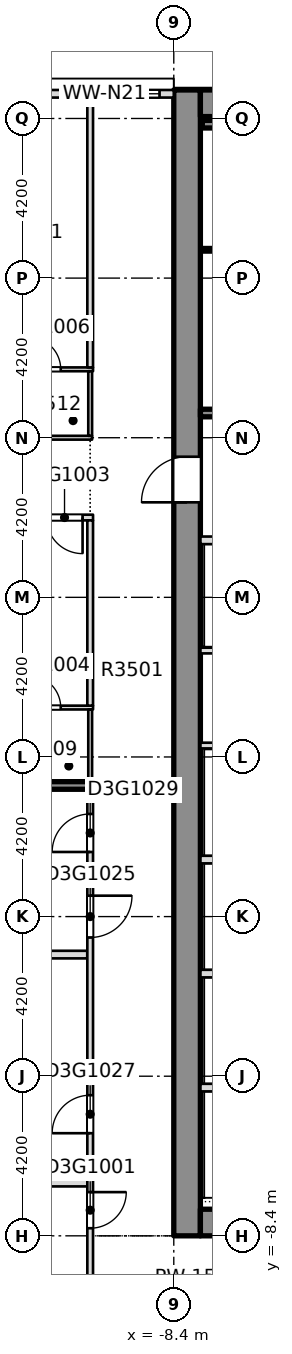
"""IFC4 building model, lengths in metres.
Left out: names, types, materials, properties, quantities, classifications, styles, units other than length and angle.
Written with IfcOpenShell. Run it as: python <this file> out.ifc"""

import sys

from ifc_helpers import new_model, si_unit, direction, frame, frame_2d, origin, place, context, subcontext, project, spatial, rectangle, extrude, element, fill, save


model = new_model("IFC4")
c1 = context("Model", 3, precision=1e-05, world=origin(), true_north=direction((0.0, 1.0)))
c2 = subcontext(c1, "Body", "Model", "MODEL_VIEW")
j1 = project(units=[si_unit("LENGTHUNIT", "METRE"), si_unit("PLANEANGLEUNIT", "RADIAN")], contexts=[c1])
p1 = place(None, origin())
s1 = spatial("IfcSite", under=j1, at=p1, CompositionType="ELEMENT")
p2 = place(p1, origin())
s2 = spatial("IfcBuilding", under=s1, at=p2, CompositionType="ELEMENT")
p3 = place(p2, frame((0.0, 0.0, 140.0)))
s3 = spatial("IfcBuildingStorey", under=s2, at=p3, CompositionType="ELEMENT", Elevation=140.0)
p4 = place(p3, frame((-8.05, -8.4, -0.4), z_axis=(0.0, 0.0, 1.0), x_axis=(0.0, 1.0, 0.0)))
e1 = element("IfcWall", 1, at=p4, inside=s3, PredefinedType="SOLIDWALL", context=c2, shape_type="SweptSolid", body=[
    extrude(rectangle(XDim=30.15, YDim=0.7, at=frame_2d((15.075, 0.0))), origin(), (0.0, 0.0, 1.0), 3.45),
])
p5 = place(p4, frame((19.3, 0.0, 0.4)))
e2 = element("IfcOpeningElement", 2, at=p5, cuts=e1, PredefinedType="OPENING", context=c2, shape_type="SweptSolid", body=[
    extrude(rectangle(XDim=1.2, YDim=2.1, at=frame_2d((0.6, 1.05))), frame((0.0, 0.36, 0.0), z_axis=(0.0, -1.0, 0.0), x_axis=(1.0, 0.0, 0.0)), (0.0, 0.0, 1.0), 0.72),
])
p6 = place(p3, frame((-7.7, -8.05, -0.4), z_axis=(0.0, 0.0, 1.0), x_axis=(1.0, 0.0, 0.0)))
e3 = element("IfcWall", 3, at=p6, inside=s3, PredefinedType="SHEAR", context=c2, shape_type="SweptSolid", body=[
    extrude(rectangle(XDim=15.4, YDim=0.7, at=frame_2d((7.7, 0.0))), origin(), (0.0, 0.0, 1.0), 3.45),
])
p7 = place(p6, frame((2.95, 0.0, 0.4)))
e4 = element("IfcOpeningElement", 4, at=p7, cuts=e3, PredefinedType="OPENING", context=c2, shape_type="SweptSolid", body=[
    extrude(rectangle(XDim=1.8, YDim=2.1, at=frame_2d((0.9, 1.05))), frame((0.0, 0.36, 0.0), z_axis=(0.0, -1.0, 0.0), x_axis=(1.0, 0.0, 0.0)), (0.0, 0.0, 1.0), 0.72),
])
p8 = place(p6, frame((10.65, 0.0, 0.4)))
e5 = element("IfcOpeningElement", 5, at=p8, cuts=e3, PredefinedType="OPENING", context=c2, shape_type="SweptSolid", body=[
    extrude(rectangle(XDim=1.8, YDim=2.1, at=frame_2d((0.9, 1.05))), frame((0.0, 0.36, 0.0), z_axis=(0.0, -1.0, 0.0), x_axis=(1.0, 0.0, 0.0)), (0.0, 0.0, 1.0), 0.72),
])
p9 = place(p3, frame((-7.7, 21.4, -0.4), z_axis=(0.0, 0.0, 1.0), x_axis=(1.0, 0.0, 0.0)))
e6 = element("IfcWall", 6, at=p9, inside=s3, PredefinedType="SHEAR", context=c2, shape_type="SweptSolid", body=[
    extrude(rectangle(XDim=15.4, YDim=0.7, at=frame_2d((7.7, 0.0))), origin(), (0.0, 0.0, 1.0), 3.45),
])
p10 = place(p3, frame((-21.55, -7.0, 0.0), z_axis=(0.0, 0.0, 1.0), x_axis=(1.0, 0.0, 0.0)))
e7 = element("IfcWall", 7, at=p10, inside=s3, PredefinedType="PARTITIONING", context=c2, shape_type="SweptSolid", body=[
    extrude(rectangle(XDim=10.875, YDim=0.2, at=frame_2d((5.438, 0.0))), origin(), (0.0, 0.0, 1.0), 3.05),
])
p11 = place(p3, frame((-16.748, -1.0, 0.0), z_axis=(0.0, 0.0, 1.0), x_axis=(1.0, 0.0, 0.0)))
e8 = element("IfcWall", 8, at=p11, inside=s3, PredefinedType="PARTITIONING", context=c2, shape_type="SweptSolid", body=[
    extrude(rectangle(XDim=6.071, YDim=0.2, at=frame_2d((3.036, 0.0))), origin(), (0.0, 0.0, 1.0), 3.05),
])
p12 = place(p3, frame((-16.75, 1.0, 0.0), z_axis=(0.0, 0.0, 1.0), x_axis=(1.0, 0.0, 0.0)))
e9 = element("IfcWall", 9, at=p12, inside=s3, PredefinedType="PARTITIONING", context=c2, shape_type="SweptSolid", body=[
    extrude(rectangle(XDim=6.075, YDim=0.2, at=frame_2d((3.038, 0.0))), origin(), (0.0, 0.0, 1.0), 3.05),
])
p13 = place(p3, frame((-13.05, 3.45, 0.0), z_axis=(0.0, 0.0, 1.0), x_axis=(1.0, 0.0, 0.0)))
e10 = element("IfcWall", 10, at=p13, inside=s3, PredefinedType="SOLIDWALL", context=c2, shape_type="SweptSolid", body=[
    extrude(rectangle(XDim=2.525, YDim=0.2, at=frame_2d((1.263, 0.0))), origin(), (0.0, 0.0, 1.0), 3.05),
])
p14 = place(p3, frame((-13.05, 5.5, 0.0), z_axis=(0.0, 0.0, 1.0), x_axis=(1.0, 0.0, 0.0)))
e11 = element("IfcWall", 11, at=p14, inside=s3, PredefinedType="PARTITIONING", context=c2, shape_type="SweptSolid", body=[
    extrude(rectangle(XDim=2.525, YDim=0.1, at=frame_2d((1.263, 0.0))), origin(), (0.0, 0.0, 1.0), 3.05),
])
p15 = place(p14, frame((0.825, 0.0, 0.0)))
e12 = element("IfcOpeningElement", 12, at=p15, cuts=e11, PredefinedType="OPENING", context=c2, shape_type="SweptSolid", body=[
    extrude(rectangle(XDim=0.85, YDim=2.1, at=frame_2d((0.425, 1.05))), frame((0.0, 0.06, 0.0), z_axis=(0.0, -1.0, 0.0), x_axis=(1.0, 0.0, 0.0)), (0.0, 0.0, 1.0), 0.12),
])
p16 = place(p3, frame((-21.55, 10.5, 0.0), z_axis=(0.0, 0.0, 1.0), x_axis=(1.0, 0.0, 0.0)))
e13 = element("IfcWall", 13, at=p16, inside=s3, PredefinedType="PARTITIONING", context=c2, shape_type="SweptSolid", body=[
    extrude(rectangle(XDim=11.025, YDim=0.15, at=frame_2d((5.513, 0.0))), origin(), (0.0, 0.0, 1.0), 3.05),
])
p17 = place(p16, frame((9.8, 0.0, 0.0)))
e14 = element("IfcOpeningElement", 14, at=p17, cuts=e13, PredefinedType="OPENING", context=c2, shape_type="SweptSolid", body=[
    extrude(rectangle(XDim=0.95, YDim=2.1, at=frame_2d((0.475, 1.05))), frame((0.0, 0.085, 0.0), z_axis=(0.0, -1.0, 0.0), x_axis=(1.0, 0.0, 0.0)), (0.0, 0.0, 1.0), 0.17),
])
p18 = place(p3, frame((-13.05, 12.6, 0.0), z_axis=(0.0, 0.0, 1.0), x_axis=(1.0, 0.0, 0.0)))
e15 = element("IfcWall", 15, at=p18, inside=s3, PredefinedType="PARTITIONING", context=c2, shape_type="SweptSolid", body=[
    extrude(rectangle(XDim=2.5, YDim=0.1, at=frame_2d((1.25, 0.0))), origin(), (0.0, 0.0, 1.0), 3.05),
])
p19 = place(p3, frame((-13.05, 14.4, 0.0), z_axis=(0.0, 0.0, 1.0), x_axis=(1.0, 0.0, 0.0)))
e16 = element("IfcWall", 16, at=p19, inside=s3, PredefinedType="PARTITIONING", context=c2, shape_type="SweptSolid", body=[
    extrude(rectangle(XDim=2.525, YDim=0.1, at=frame_2d((1.263, 0.0))), origin(), (0.0, 0.0, 1.0), 3.05),
])
p20 = place(p19, frame((0.825, 0.0, 0.0)))
e17 = element("IfcOpeningElement", 17, at=p20, cuts=e16, PredefinedType="OPENING", context=c2, shape_type="SweptSolid", body=[
    extrude(rectangle(XDim=0.85, YDim=2.1, at=frame_2d((0.425, 1.05))), frame((0.0, 0.06, 0.0), z_axis=(0.0, -1.0, 0.0), x_axis=(1.0, 0.0, 0.0)), (0.0, 0.0, 1.0), 0.12),
])
p21 = place(p3, frame((-10.6, -10.525, 0.0), z_axis=(0.0, 0.0, 1.0), x_axis=(0.0, 1.0, 0.0)))
e18 = element("IfcWall", 18, at=p21, inside=s3, PredefinedType="PARTITIONING", context=c2, shape_type="SweptSolid", body=[
    extrude(rectangle(XDim=13.875, YDim=0.15, at=frame_2d((6.938, 0.0))), origin(), (0.0, 0.0, 1.0), 3.05),
])
p22 = place(p21, frame((2.325, 0.0, 0.0)))
e19 = element("IfcOpeningElement", 19, at=p22, cuts=e18, PredefinedType="OPENING", context=c2, shape_type="SweptSolid", body=[
    extrude(rectangle(XDim=0.95, YDim=2.1, at=frame_2d((0.475, 1.05))), frame((0.0, 0.085, 0.0), z_axis=(0.0, -1.0, 0.0), x_axis=(1.0, 0.0, 0.0)), (0.0, 0.0, 1.0), 0.17),
])
p23 = place(p21, frame((9.975, 0.0, 0.0)))
e20 = element("IfcOpeningElement", 20, at=p23, cuts=e18, PredefinedType="OPENING", context=c2, shape_type="SweptSolid", body=[
    extrude(rectangle(XDim=1.1, YDim=2.1, at=frame_2d((0.55, 1.05))), frame((0.0, 0.085, 0.0), z_axis=(0.0, -1.0, 0.0), x_axis=(1.0, 0.0, 0.0)), (0.0, 0.0, 1.0), 0.17),
])
p24 = place(p21, frame((4.825, 0.0, 0.0)))
e21 = element("IfcOpeningElement", 21, at=p24, cuts=e18, PredefinedType="OPENING", context=c2, shape_type="SweptSolid", body=[
    extrude(rectangle(XDim=1.0, YDim=2.1, at=frame_2d((0.5, 1.05))), frame((0.0, 0.085, 0.0), z_axis=(0.0, -1.0, 0.0), x_axis=(1.0, 0.0, 0.0)), (0.0, 0.0, 1.0), 0.17),
])
p25 = place(p21, frame((12.225, 0.0, 0.0)))
e22 = element("IfcOpeningElement", 22, at=p25, cuts=e18, PredefinedType="OPENING", context=c2, shape_type="SweptSolid", body=[
    extrude(rectangle(XDim=1.0, YDim=2.1, at=frame_2d((0.5, 1.05))), frame((0.0, 0.085, 0.0), z_axis=(0.0, -1.0, 0.0), x_axis=(1.0, 0.0, 0.0)), (0.0, 0.0, 1.0), 0.17),
])
p26 = place(p3, frame((-10.6, 3.45, 0.0), z_axis=(0.0, 0.0, 1.0), x_axis=(0.0, 1.0, 0.0)))
e23 = element("IfcWall", 23, at=p26, inside=s3, PredefinedType="PARTITIONING", context=c2, shape_type="SweptSolid", body=[
    extrude(rectangle(XDim=2.0, YDim=0.1, at=frame_2d((1.0, 0.0))), origin(), (0.0, 0.0, 1.0), 3.05),
])
p27 = place(p3, frame((-10.6, 5.55, 0.0), z_axis=(0.0, 0.0, 1.0), x_axis=(0.0, 1.0, 0.0)))
e24 = element("IfcWall", 24, at=p27, inside=s3, PredefinedType="PARTITIONING", context=c2, shape_type="SweptSolid", body=[
    extrude(rectangle(XDim=4.875, YDim=0.15, at=frame_2d((2.438, 0.0))), origin(), (0.0, 0.0, 1.0), 3.05),
])
p28 = place(p3, frame((-10.6, 12.65, 0.0), z_axis=(0.0, 0.0, 1.0), x_axis=(0.0, 1.0, 0.0)))
e25 = element("IfcWall", 25, at=p28, inside=s3, PredefinedType="PARTITIONING", context=c2, shape_type="SweptSolid", body=[
    extrude(rectangle(XDim=1.7, YDim=0.1, at=frame_2d((0.85, 0.0))), origin(), (0.0, 0.0, 1.0), 3.05),
])
p29 = place(p3, frame((-10.6, 14.45, 0.0), z_axis=(0.0, 0.0, 1.0), x_axis=(0.0, 1.0, 0.0)))
e26 = element("IfcWall", 26, at=p29, inside=s3, PredefinedType="PARTITIONING", context=c2, shape_type="SweptSolid", body=[
    extrude(rectangle(XDim=7.1, YDim=0.15, at=frame_2d((3.55, 0.0))), origin(), (0.0, 0.0, 1.0), 3.05),
])
p30 = place(p3, frame((-8.4, 21.65, 0.0), z_axis=(0.0, 0.0, 1.0), x_axis=(-1.0, 0.0, 0.0)))
e27 = element("IfcWall", 27, at=p30, inside=s3, PredefinedType="STANDARD", context=c2, shape_type="SweptSolid", body=[
    extrude(rectangle(XDim=3.65, YDim=0.2, at=frame_2d((1.825, 0.0))), origin(), (0.0, 0.0, 1.0), 3.05),
])
p31 = place(p30, frame((0.375, 0.0, 0.2)))
e28 = element("IfcOpeningElement", 28, at=p31, cuts=e27, PredefinedType="OPENING", context=c2, shape_type="SweptSolid", body=[
    extrude(rectangle(XDim=1.8, YDim=2.65, at=frame_2d((0.9, 1.325))), frame((0.0, 0.11, 0.0), z_axis=(0.0, -1.0, 0.0), x_axis=(1.0, 0.0, 0.0)), (0.0, 0.0, 1.0), 0.22),
])
for number, where, z_axis, x_axis in (
    (29, (-7.699, -4.5, 0.0), (0.0, 0.0, 1.0), (1.0, 0.0, 0.0)),
    (30, (-7.699, -1.5, 0.0), (0.0, 0.0, 1.0), (1.0, 0.0, 0.0)),
    (31, (-7.699, 1.5, 0.0), (0.0, 0.0, 1.0), (1.0, 0.0, 0.0)),
):
    element("IfcWall", number, at=place(p3, frame(where, z_axis=z_axis, x_axis=x_axis)), inside=s3, PredefinedType="PARTITIONING", context=c2, shape_type="SweptSolid", body=[
        extrude(rectangle(XDim=2.124, YDim=0.2, at=frame_2d((1.062, 0.0))), origin(), (0.0, 0.0, 1.0), 3.05),
    ])
p32 = place(p3, frame((-7.699, 4.5, 0.0), z_axis=(0.0, 0.0, 1.0), x_axis=(1.0, 0.0, 0.0)))
e32 = element("IfcWall", 32, at=p32, inside=s3, PredefinedType="PARTITIONING", context=c2, shape_type="SweptSolid", body=[
    extrude(rectangle(XDim=2.274, YDim=0.15, at=frame_2d((1.137, 0.0))), origin(), (0.0, 0.0, 1.0), 3.05),
])
p33 = place(p3, frame((-7.699, 7.0, 0.0), z_axis=(0.0, 0.0, 1.0), x_axis=(1.0, 0.0, 0.0)))
e33 = element("IfcWall", 33, at=p33, inside=s3, PredefinedType="PARTITIONING", context=c2, shape_type="SweptSolid", body=[
    extrude(rectangle(XDim=15.398, YDim=0.15, at=frame_2d((7.699, 0.0))), origin(), (0.0, 0.0, 1.0), 3.05),
])
p34 = place(p33, frame((6.999, 0.0, 0.0)))
e34 = element("IfcOpeningElement", 34, at=p34, cuts=e33, PredefinedType="OPENING", context=c2, shape_type="SweptSolid", body=[
    extrude(rectangle(XDim=1.4, YDim=2.1, at=frame_2d((0.7, 1.05))), frame((0.0, 0.085, 0.0), z_axis=(0.0, -1.0, 0.0), x_axis=(1.0, 0.0, 0.0)), (0.0, 0.0, 1.0), 0.17),
])
p35 = place(p3, frame((-7.699, 9.9, 0.0), z_axis=(0.0, 0.0, 1.0), x_axis=(1.0, 0.0, 0.0)))
e35 = element("IfcWall", 35, at=p35, inside=s3, PredefinedType="PARTITIONING", context=c2, shape_type="SweptSolid", body=[
    extrude(rectangle(XDim=4.099, YDim=0.2, at=frame_2d((2.049, 0.0))), origin(), (0.0, 0.0, 1.0), 3.05),
])
p36 = place(p35, frame((0.749, 0.0, 0.0)))
e36 = element("IfcOpeningElement", 36, at=p36, cuts=e35, PredefinedType="OPENING", context=c2, shape_type="SweptSolid", body=[
    extrude(rectangle(XDim=1.1, YDim=2.1, at=frame_2d((0.55, 1.05))), frame((0.0, 0.11, 0.0), z_axis=(0.0, -1.0, 0.0), x_axis=(1.0, 0.0, 0.0)), (0.0, 0.0, 1.0), 0.22),
])
p37 = place(p3, frame((-7.699, 13.25, 0.0), z_axis=(0.0, 0.0, 1.0), x_axis=(1.0, 0.0, 0.0)))
e37 = element("IfcWall", 37, at=p37, inside=s3, PredefinedType="SOLIDWALL", context=c2, shape_type="SweptSolid", body=[
    extrude(rectangle(XDim=4.274, YDim=0.2, at=frame_2d((2.137, 0.0))), origin(), (0.0, 0.0, 1.0), 3.05),
])
p38 = place(p37, frame((1.249, 0.0, 0.0)))
e38 = element("IfcOpeningElement", 38, at=p38, cuts=e37, PredefinedType="OPENING", context=c2, shape_type="SweptSolid", body=[
    extrude(rectangle(XDim=1.2, YDim=2.1, at=frame_2d((0.6, 1.05))), frame((0.0, 0.11, 0.0), z_axis=(0.0, -1.0, 0.0), x_axis=(1.0, 0.0, 0.0)), (0.0, 0.0, 1.0), 0.22),
])
p39 = place(p3, frame((-7.65, 20.85, 0.0), z_axis=(0.0, 0.0, 1.0), x_axis=(1.0, 0.0, 0.0)))
e39 = element("IfcWall", 39, at=p39, inside=s3, PredefinedType="SOLIDWALL", context=c2, shape_type="SweptSolid", body=[
    extrude(rectangle(XDim=3.5, YDim=0.2, at=frame_2d((1.75, 0.0))), origin(), (0.0, 0.0, 1.0), 3.05),
])
p40 = place(p22, origin())
e40 = element("IfcDoor", 40, at=p40, inside=s3, OperationType="SINGLE_SWING_RIGHT", PredefinedType="DOOR", context=c2, shape_type="SweptSolid", body=[
    extrude(rectangle(XDim=0.95, YDim=2.1, at=frame_2d((0.475, 1.05))), frame((0.0, 0.025, 0.0), z_axis=(0.0, -1.0, 0.0), x_axis=(1.0, 0.0, 0.0)), (0.0, 0.0, 1.0), 0.05),
])
fill(e19, e40)
p41 = place(p17, origin())
e41 = element("IfcDoor", 41, at=p41, inside=s3, OperationType="SINGLE_SWING_RIGHT", PredefinedType="DOOR", context=c2, shape_type="SweptSolid", body=[
    extrude(rectangle(XDim=0.95, YDim=2.1, at=frame_2d((0.475, 1.05))), frame((0.0, 0.025, 0.0), z_axis=(0.0, -1.0, 0.0), x_axis=(1.0, 0.0, 0.0)), (0.0, 0.0, 1.0), 0.05),
])
fill(e14, e41)
p42 = place(p15, origin())
e42 = element("IfcDoor", 42, at=p42, inside=s3, OperationType="SINGLE_SWING_RIGHT", PredefinedType="DOOR", context=c2, shape_type="SweptSolid", body=[
    extrude(rectangle(XDim=0.85, YDim=2.1, at=frame_2d((0.425, 1.05))), frame((0.0, 0.025, 0.0), z_axis=(0.0, -1.0, 0.0), x_axis=(1.0, 0.0, 0.0)), (0.0, 0.0, 1.0), 0.05),
])
fill(e12, e42)
p43 = place(p20, origin())
e43 = element("IfcDoor", 43, at=p43, inside=s3, OperationType="SINGLE_SWING_RIGHT", PredefinedType="DOOR", context=c2, shape_type="SweptSolid", body=[
    extrude(rectangle(XDim=0.85, YDim=2.1, at=frame_2d((0.425, 1.05))), frame((0.0, 0.025, 0.0), z_axis=(0.0, -1.0, 0.0), x_axis=(1.0, 0.0, 0.0)), (0.0, 0.0, 1.0), 0.05),
])
fill(e17, e43)
p44 = place(p23, origin())
e44 = element("IfcDoor", 44, at=p44, inside=s3, OperationType="SINGLE_SWING_RIGHT", PredefinedType="DOOR", context=c2, shape_type="SweptSolid", body=[
    extrude(rectangle(XDim=1.1, YDim=2.1, at=frame_2d((0.55, 1.05))), frame((0.0, 0.025, 0.0), z_axis=(0.0, -1.0, 0.0), x_axis=(1.0, 0.0, 0.0)), (0.0, 0.0, 1.0), 0.05),
])
fill(e20, e44)
p45 = place(p24, origin())
e45 = element("IfcDoor", 45, at=p45, inside=s3, OperationType="SINGLE_SWING_RIGHT", PredefinedType="DOOR", context=c2, shape_type="SweptSolid", body=[
    extrude(rectangle(XDim=1.0, YDim=2.1, at=frame_2d((0.5, 1.05))), frame((0.0, 0.025, 0.0), z_axis=(0.0, -1.0, 0.0), x_axis=(1.0, 0.0, 0.0)), (0.0, 0.0, 1.0), 0.05),
])
fill(e21, e45)
p46 = place(p25, origin())
e46 = element("IfcDoor", 46, at=p46, inside=s3, OperationType="SINGLE_SWING_RIGHT", PredefinedType="DOOR", context=c2, shape_type="SweptSolid", body=[
    extrude(rectangle(XDim=1.0, YDim=2.1, at=frame_2d((0.5, 1.05))), frame((0.0, 0.025, 0.0), z_axis=(0.0, -1.0, 0.0), x_axis=(1.0, 0.0, 0.0)), (0.0, 0.0, 1.0), 0.05),
])
fill(e22, e46)
p47 = place(p31, origin())
e47 = element("IfcWindow", 47, at=p47, inside=s3, PartitioningType="SINGLE_PANEL", PredefinedType="WINDOW", context=c2, shape_type="SweptSolid", body=[
    extrude(rectangle(XDim=1.8, YDim=2.65, at=frame_2d((0.9, 1.325))), frame((0.0, 0.03, 0.0), z_axis=(0.0, -1.0, 0.0), x_axis=(1.0, 0.0, 0.0)), (0.0, 0.0, 1.0), 0.06),
])
fill(e28, e47)
p48 = place(p5, origin())
e48 = element("IfcDoor", 48, at=p48, inside=s3, OperationType="SINGLE_SWING_LEFT", PredefinedType="DOOR", context=c2, shape_type="SweptSolid", body=[
    extrude(rectangle(XDim=1.2, YDim=2.1, at=frame_2d((0.6, 1.05))), frame((0.0, 0.025, 0.0), z_axis=(0.0, -1.0, 0.0), x_axis=(1.0, 0.0, 0.0)), (0.0, 0.0, 1.0), 0.05),
])
fill(e2, e48)
save(model, sys.argv[1])
